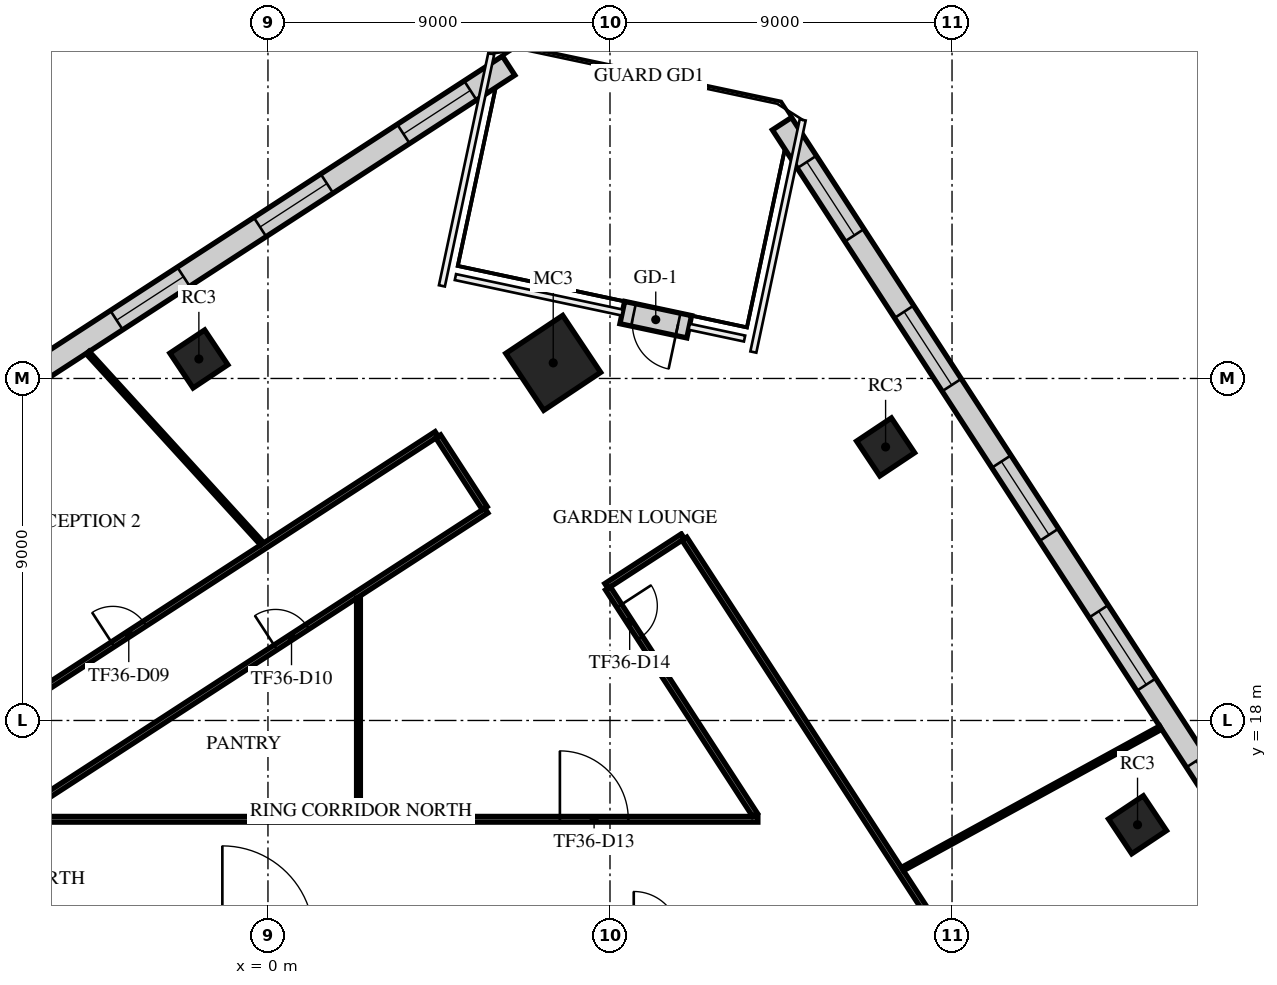
"""IFC4 building model, lengths in metres.
Left out: names, types, materials, properties, quantities, classifications, styles, units other than length and angle.
Written with IfcOpenShell. Run it as: python <this file> out.ifc"""

import sys

from ifc_helpers import new_model, si_unit, direction, frame, frame_2d, origin, origin_2d, place, context, subcontext, project, spatial, rectangle, extrude, element, fill, save


model = new_model("IFC4")
c1 = context("Model", 3, precision=1e-05, world=origin(), true_north=direction((0.0, 1.0)))
c2 = subcontext(c1, "Body", "Model", "MODEL_VIEW")
j1 = project(units=[si_unit("LENGTHUNIT", "METRE"), si_unit("PLANEANGLEUNIT", "RADIAN")], contexts=[c1])
p1 = place(None, origin())
s1 = spatial("IfcSite", under=j1, at=p1, CompositionType="ELEMENT")
p2 = place(p1, origin())
s2 = spatial("IfcBuilding", under=s1, at=p2, CompositionType="ELEMENT")
p3 = place(p2, frame((0.0, 0.0, 155.7)))
s3 = spatial("IfcBuildingStorey", under=s2, at=p3, CompositionType="ELEMENT", Elevation=155.7)
p4 = place(p3, frame((7.506, 27.41, 0.0), z_axis=(0.0, 0.0, 1.0), x_axis=(0.832028680356, 0.55473261583, 0.0)))
e1 = element("IfcColumn", 1, at=p4, inside=s3, PredefinedType="COLUMN", context=c2, shape_type="SweptSolid", body=[
    extrude(rectangle(XDim=1.8, YDim=1.8, at=origin_2d()), origin(), (0.0, 0.0, 1.0), 4.0),
])
for number, where, z_axis, x_axis in (
    (2, (-1.818, 27.513, 0.0), (0.0, 0.0, 1.0), (0.832, 0.555, 0.0)),
    (3, (22.881, 15.255, 0.0), (0.0, 0.0, 1.0), (0.832, 0.555, 0.0)),
    (4, (16.252, 25.198, 0.0), (0.0, 0.0, 1.0), (0.832, 0.555, 0.0)),
):
    element("IfcColumn", number, at=place(p3, frame(where, z_axis=z_axis, x_axis=x_axis)), inside=s3, PredefinedType="COLUMN", context=c2, shape_type="SweptSolid", body=[
        extrude(rectangle(XDim=1.1, YDim=1.1, at=origin_2d()), origin(), (0.0, 0.0, 1.0), 4.0),
    ])
p5 = place(p3, frame((6.333, 35.233, 0.0), z_axis=(0.0, 0.0, 1.0), x_axis=(-0.83867264201, -0.544635841222, 0.0)))
e5 = element("IfcWall", 5, at=p5, inside=s3, PredefinedType="STANDARD", context=c2, shape_type="SweptSolid", body=[
    extrude(rectangle(XDim=49.376, YDim=0.6, at=frame_2d((24.688, 0.0))), origin(), (0.0, 0.0, 1.0), 3.6),
])
p6 = place(p5, frame((1.2, 0.0, 0.9)))
e6 = element("IfcOpeningElement", 6, at=p6, cuts=e5, PredefinedType="OPENING", context=c2, shape_type="SweptSolid", body=[
    extrude(rectangle(XDim=2.1, YDim=2.1, at=frame_2d((1.05, 1.05))), frame((0.0, 0.31, 0.0), z_axis=(0.0, -1.0, 0.0), x_axis=(1.0, 0.0, 0.0)), (0.0, 0.0, 1.0), 0.62),
])
p7 = place(p5, frame((5.7, 0.0, 0.9)))
e7 = element("IfcOpeningElement", 7, at=p7, cuts=e5, PredefinedType="OPENING", context=c2, shape_type="SweptSolid", body=[
    extrude(rectangle(XDim=2.1, YDim=2.1, at=frame_2d((1.05, 1.05))), frame((0.0, 0.31, 0.0), z_axis=(0.0, -1.0, 0.0), x_axis=(1.0, 0.0, 0.0)), (0.0, 0.0, 1.0), 0.62),
])
p8 = place(p5, frame((10.2, 0.0, 0.9)))
e8 = element("IfcOpeningElement", 8, at=p8, cuts=e5, PredefinedType="OPENING", context=c2, shape_type="SweptSolid", body=[
    extrude(rectangle(XDim=2.1, YDim=2.1, at=frame_2d((1.05, 1.05))), frame((0.0, 0.31, 0.0), z_axis=(0.0, -1.0, 0.0), x_axis=(1.0, 0.0, 0.0)), (0.0, 0.0, 1.0), 0.62),
])
p9 = place(p5, frame((14.7, 0.0, 0.9)))
e9 = element("IfcOpeningElement", 9, at=p9, cuts=e5, PredefinedType="OPENING", context=c2, shape_type="SweptSolid", body=[
    extrude(rectangle(XDim=2.1, YDim=2.1, at=frame_2d((1.05, 1.05))), frame((0.0, 0.31, 0.0), z_axis=(0.0, -1.0, 0.0), x_axis=(1.0, 0.0, 0.0)), (0.0, 0.0, 1.0), 0.62),
])
p10 = place(p5, frame((19.2, 0.0, 0.9)))
e10 = element("IfcOpeningElement", 10, at=p10, cuts=e5, PredefinedType="OPENING", context=c2, shape_type="SweptSolid", body=[
    extrude(rectangle(XDim=2.1, YDim=2.1, at=frame_2d((1.05, 1.05))), frame((0.0, 0.31, 0.0), z_axis=(0.0, -1.0, 0.0), x_axis=(1.0, 0.0, 0.0)), (0.0, 0.0, 1.0), 0.62),
])
p11 = place(p5, frame((23.7, 0.0, 0.9)))
e11 = element("IfcOpeningElement", 11, at=p11, cuts=e5, PredefinedType="OPENING", context=c2, shape_type="SweptSolid", body=[
    extrude(rectangle(XDim=2.1, YDim=2.1, at=frame_2d((1.05, 1.05))), frame((0.0, 0.31, 0.0), z_axis=(0.0, -1.0, 0.0), x_axis=(1.0, 0.0, 0.0)), (0.0, 0.0, 1.0), 0.62),
])
p12 = place(p5, frame((28.2, 0.0, 0.9)))
e12 = element("IfcOpeningElement", 12, at=p12, cuts=e5, PredefinedType="OPENING", context=c2, shape_type="SweptSolid", body=[
    extrude(rectangle(XDim=2.1, YDim=2.1, at=frame_2d((1.05, 1.05))), frame((0.0, 0.31, 0.0), z_axis=(0.0, -1.0, 0.0), x_axis=(1.0, 0.0, 0.0)), (0.0, 0.0, 1.0), 0.62),
])
p13 = place(p5, frame((32.7, 0.0, 0.9)))
e13 = element("IfcOpeningElement", 13, at=p13, cuts=e5, PredefinedType="OPENING", context=c2, shape_type="SweptSolid", body=[
    extrude(rectangle(XDim=2.1, YDim=2.1, at=frame_2d((1.05, 1.05))), frame((0.0, 0.31, 0.0), z_axis=(0.0, -1.0, 0.0), x_axis=(1.0, 0.0, 0.0)), (0.0, 0.0, 1.0), 0.62),
])
p14 = place(p5, frame((37.2, 0.0, 0.9)))
e14 = element("IfcOpeningElement", 14, at=p14, cuts=e5, PredefinedType="OPENING", context=c2, shape_type="SweptSolid", body=[
    extrude(rectangle(XDim=2.1, YDim=2.1, at=frame_2d((1.05, 1.05))), frame((0.0, 0.31, 0.0), z_axis=(0.0, -1.0, 0.0), x_axis=(1.0, 0.0, 0.0)), (0.0, 0.0, 1.0), 0.62),
])
p15 = place(p5, frame((41.7, 0.0, 0.9)))
e15 = element("IfcOpeningElement", 15, at=p15, cuts=e5, PredefinedType="OPENING", context=c2, shape_type="SweptSolid", body=[
    extrude(rectangle(XDim=2.1, YDim=2.1, at=frame_2d((1.05, 1.05))), frame((0.0, 0.31, 0.0), z_axis=(0.0, -1.0, 0.0), x_axis=(1.0, 0.0, 0.0)), (0.0, 0.0, 1.0), 0.62),
])
p16 = place(p5, frame((46.138, 0.0, 0.9)))
e16 = element("IfcOpeningElement", 16, at=p16, cuts=e5, PredefinedType="OPENING", context=c2, shape_type="SweptSolid", body=[
    extrude(rectangle(XDim=2.1, YDim=2.1, at=frame_2d((1.05, 1.05))), frame((0.0, 0.31, 0.0), z_axis=(0.0, -1.0, 0.0), x_axis=(1.0, 0.0, 0.0)), (0.0, 0.0, 1.0), 0.62),
])
p17 = place(p3, frame((36.496, -1.667, 0.0), z_axis=(0.0, 0.0, 1.0), x_axis=(-0.544637117646, 0.838671813096, 0.0)))
e17 = element("IfcWall", 17, at=p17, inside=s3, PredefinedType="STANDARD", context=c2, shape_type="SweptSolid", body=[
    extrude(rectangle(XDim=42.176, YDim=0.6, at=frame_2d((21.088, 0.0))), origin(), (0.0, 0.0, 1.0), 3.6),
])
p18 = place(p17, frame((1.138, 0.0, 0.9)))
e18 = element("IfcOpeningElement", 18, at=p18, cuts=e17, PredefinedType="OPENING", context=c2, shape_type="SweptSolid", body=[
    extrude(rectangle(XDim=2.3, YDim=2.1, at=frame_2d((1.15, 1.05))), frame((0.0, 0.31, 0.0), z_axis=(0.0, -1.0, 0.0), x_axis=(1.0, 0.0, 0.0)), (0.0, 0.0, 1.0), 0.62),
])
p19 = place(p17, frame((5.776, 0.0, 0.9)))
e19 = element("IfcOpeningElement", 19, at=p19, cuts=e17, PredefinedType="OPENING", context=c2, shape_type="SweptSolid", body=[
    extrude(rectangle(XDim=2.3, YDim=2.1, at=frame_2d((1.15, 1.05))), frame((0.0, 0.31, 0.0), z_axis=(0.0, -1.0, 0.0), x_axis=(1.0, 0.0, 0.0)), (0.0, 0.0, 1.0), 0.62),
])
p20 = place(p17, frame((10.476, 0.0, 0.9)))
e20 = element("IfcOpeningElement", 20, at=p20, cuts=e17, PredefinedType="OPENING", context=c2, shape_type="SweptSolid", body=[
    extrude(rectangle(XDim=2.3, YDim=2.1, at=frame_2d((1.15, 1.05))), frame((0.0, 0.31, 0.0), z_axis=(0.0, -1.0, 0.0), x_axis=(1.0, 0.0, 0.0)), (0.0, 0.0, 1.0), 0.62),
])
p21 = place(p17, frame((15.176, 0.0, 0.9)))
e21 = element("IfcOpeningElement", 21, at=p21, cuts=e17, PredefinedType="OPENING", context=c2, shape_type="SweptSolid", body=[
    extrude(rectangle(XDim=2.3, YDim=2.1, at=frame_2d((1.15, 1.05))), frame((0.0, 0.31, 0.0), z_axis=(0.0, -1.0, 0.0), x_axis=(1.0, 0.0, 0.0)), (0.0, 0.0, 1.0), 0.62),
])
p22 = place(p17, frame((19.876, 0.0, 0.9)))
e22 = element("IfcOpeningElement", 22, at=p22, cuts=e17, PredefinedType="OPENING", context=c2, shape_type="SweptSolid", body=[
    extrude(rectangle(XDim=2.3, YDim=2.1, at=frame_2d((1.15, 1.05))), frame((0.0, 0.31, 0.0), z_axis=(0.0, -1.0, 0.0), x_axis=(1.0, 0.0, 0.0)), (0.0, 0.0, 1.0), 0.62),
])
p23 = place(p17, frame((24.576, 0.0, 0.9)))
e23 = element("IfcOpeningElement", 23, at=p23, cuts=e17, PredefinedType="OPENING", context=c2, shape_type="SweptSolid", body=[
    extrude(rectangle(XDim=2.3, YDim=2.1, at=frame_2d((1.15, 1.05))), frame((0.0, 0.31, 0.0), z_axis=(0.0, -1.0, 0.0), x_axis=(1.0, 0.0, 0.0)), (0.0, 0.0, 1.0), 0.62),
])
p24 = place(p17, frame((29.276, 0.0, 0.9)))
e24 = element("IfcOpeningElement", 24, at=p24, cuts=e17, PredefinedType="OPENING", context=c2, shape_type="SweptSolid", body=[
    extrude(rectangle(XDim=2.3, YDim=2.1, at=frame_2d((1.15, 1.05))), frame((0.0, 0.31, 0.0), z_axis=(0.0, -1.0, 0.0), x_axis=(1.0, 0.0, 0.0)), (0.0, 0.0, 1.0), 0.62),
])
p25 = place(p17, frame((33.976, 0.0, 0.9)))
e25 = element("IfcOpeningElement", 25, at=p25, cuts=e17, PredefinedType="OPENING", context=c2, shape_type="SweptSolid", body=[
    extrude(rectangle(XDim=2.3, YDim=2.1, at=frame_2d((1.15, 1.05))), frame((0.0, 0.31, 0.0), z_axis=(0.0, -1.0, 0.0), x_axis=(1.0, 0.0, 0.0)), (0.0, 0.0, 1.0), 0.62),
])
p26 = place(p17, frame((38.676, 0.0, 0.9)))
e26 = element("IfcOpeningElement", 26, at=p26, cuts=e17, PredefinedType="OPENING", context=c2, shape_type="SweptSolid", body=[
    extrude(rectangle(XDim=2.3, YDim=2.1, at=frame_2d((1.15, 1.05))), frame((0.0, 0.31, 0.0), z_axis=(0.0, -1.0, 0.0), x_axis=(1.0, 0.0, 0.0)), (0.0, 0.0, 1.0), 0.62),
])
p27 = place(p3, frame((11.084, 28.361, 0.0), z_axis=(0.0, 0.0, 1.0), x_axis=(-0.978174015353, 0.207787380965, 0.0)))
e27 = element("IfcWall", 27, at=p27, inside=s3, PredefinedType="STANDARD", context=c2, shape_type="SweptSolid", body=[
    extrude(rectangle(XDim=1.8, YDim=0.6, at=frame_2d((0.9, 0.0))), origin(), (0.0, 0.0, 1.0), 3.6),
])
p28 = place(p27, frame((0.3, 0.0, 0.0)))
e28 = element("IfcOpeningElement", 28, at=p28, cuts=e27, PredefinedType="OPENING", context=c2, shape_type="SweptSolid", body=[
    extrude(rectangle(XDim=1.2, YDim=2.4, at=frame_2d((0.6, 1.2))), frame((0.0, 0.31, 0.0), z_axis=(0.0, -1.0, 0.0), x_axis=(1.0, 0.0, 0.0)), (0.0, 0.0, 1.0), 0.62),
])
p29 = place(p3, frame((-25.134, 6.331, 0.0), z_axis=(0.0, 0.0, 1.0), x_axis=(0.838655992286, 0.544661478904, 0.0)))
e29 = element("IfcWall", 29, at=p29, inside=s3, PredefinedType="PARTITIONING", context=c2, shape_type="SweptSolid", body=[
    extrude(rectangle(XDim=35.262, YDim=0.15, at=frame_2d((17.631, 0.0))), origin(), (0.0, 0.0, 1.0), 3.15),
])
p30 = place(p29, frame((0.55, 0.0, 0.0)))
e30 = element("IfcOpeningElement", 30, at=p30, cuts=e29, PredefinedType="OPENING", context=c2, shape_type="SweptSolid", body=[
    extrude(rectangle(XDim=1.0, YDim=2.1, at=frame_2d((0.5, 1.05))), frame((0.0, 0.085, 0.0), z_axis=(0.0, -1.0, 0.0), x_axis=(1.0, 0.0, 0.0)), (0.0, 0.0, 1.0), 0.17),
])
p31 = place(p29, frame((5.989, 0.0, 0.0)))
e31 = element("IfcOpeningElement", 31, at=p31, cuts=e29, PredefinedType="OPENING", context=c2, shape_type="SweptSolid", body=[
    extrude(rectangle(XDim=1.0, YDim=2.1, at=frame_2d((0.5, 1.05))), frame((0.0, 0.085, 0.0), z_axis=(0.0, -1.0, 0.0), x_axis=(1.0, 0.0, 0.0)), (0.0, 0.0, 1.0), 0.17),
])
p32 = place(p29, frame((17.183, 0.0, 0.0)))
e32 = element("IfcOpeningElement", 32, at=p32, cuts=e29, PredefinedType="OPENING", context=c2, shape_type="SweptSolid", body=[
    extrude(rectangle(XDim=1.0, YDim=2.1, at=frame_2d((0.5, 1.05))), frame((0.0, 0.085, 0.0), z_axis=(0.0, -1.0, 0.0), x_axis=(1.0, 0.0, 0.0)), (0.0, 0.0, 1.0), 0.17),
])
p33 = place(p29, frame((25.102, 0.0, 0.0)))
e33 = element("IfcOpeningElement", 33, at=p33, cuts=e29, PredefinedType="OPENING", context=c2, shape_type="SweptSolid", body=[
    extrude(rectangle(XDim=1.0, YDim=2.1, at=frame_2d((0.5, 1.05))), frame((0.0, 0.085, 0.0), z_axis=(0.0, -1.0, 0.0), x_axis=(1.0, 0.0, 0.0)), (0.0, 0.0, 1.0), 0.17),
])
p34 = place(p3, frame((-6.763, 15.4, 0.0), z_axis=(0.0, 0.0, 1.0), x_axis=(1.0, 0.0, 0.0)))
e34 = element("IfcWall", 34, at=p34, inside=s3, PredefinedType="PARTITIONING", context=c2, shape_type="SweptSolid", body=[
    extrude(rectangle(XDim=19.654, YDim=0.15, at=frame_2d((9.827, 0.0))), origin(), (0.0, 0.0, 1.0), 3.15),
])
p35 = place(p34, frame((14.445, 0.0, 0.0)))
e35 = element("IfcOpeningElement", 35, at=p35, cuts=e34, PredefinedType="OPENING", context=c2, shape_type="SweptSolid", body=[
    extrude(rectangle(XDim=1.8, YDim=2.1, at=frame_2d((0.9, 1.05))), frame((0.0, 0.085, 0.0), z_axis=(0.0, -1.0, 0.0), x_axis=(1.0, 0.0, 0.0)), (0.0, 0.0, 1.0), 0.17),
])
p36 = place(p3, frame((-6.551, 15.538, 0.0), z_axis=(0.0, 0.0, 1.0), x_axis=(0.838658107211, 0.544658222383, 0.0)))
e36 = element("IfcWall", 36, at=p36, inside=s3, PredefinedType="PARTITIONING", context=c2, shape_type="SweptSolid", body=[
    extrude(rectangle(XDim=14.663, YDim=0.15, at=frame_2d((7.331, 0.0))), origin(), (0.0, 0.0, 1.0), 3.15),
])
p37 = place(p36, frame((8.05, 0.0, 0.0)))
e37 = element("IfcOpeningElement", 37, at=p37, cuts=e36, PredefinedType="OPENING", context=c2, shape_type="SweptSolid", body=[
    extrude(rectangle(XDim=1.0, YDim=2.1, at=frame_2d((0.5, 1.05))), frame((0.0, 0.085, 0.0), z_axis=(0.0, -1.0, 0.0), x_axis=(1.0, 0.0, 0.0)), (0.0, 0.0, 1.0), 0.17),
])
p38 = place(p3, frame((4.48, 25.474, 0.0), z_axis=(0.0, 0.0, 1.0), x_axis=(0.544568768869, -0.83871619513, 0.0)))
e38 = element("IfcWall", 38, at=p38, inside=s3, PredefinedType="PARTITIONING", context=c2, shape_type="SweptSolid", body=[
    extrude(rectangle(XDim=2.25, YDim=0.15, at=frame_2d((1.125, 0.0))), origin(), (0.0, 0.0, 1.0), 3.6),
])
p39 = place(p3, frame((8.905, 21.539, 0.0), z_axis=(0.0, 0.0, 1.0), x_axis=(0.838613296719, 0.544727214821, 0.0)))
e39 = element("IfcWall", 39, at=p39, inside=s3, PredefinedType="PARTITIONING", context=c2, shape_type="SweptSolid", body=[
    extrude(rectangle(XDim=2.399, YDim=0.15, at=frame_2d((1.2, 0.0))), origin(), (0.0, 0.0, 1.0), 3.6),
])
p40 = place(p3, frame((8.946, 21.476, 0.0), z_axis=(0.0, 0.0, 1.0), x_axis=(0.544591006373, -0.838701756155, 0.0)))
e40 = element("IfcWall", 40, at=p40, inside=s3, PredefinedType="PARTITIONING", context=c2, shape_type="SweptSolid", body=[
    extrude(rectangle(XDim=7.106, YDim=0.15, at=frame_2d((3.553, 0.0))), origin(), (0.0, 0.0, 1.0), 3.15),
])
p41 = place(p40, frame((0.55, 0.0, 0.0)))
e41 = element("IfcOpeningElement", 41, at=p41, cuts=e40, PredefinedType="OPENING", context=c2, shape_type="SweptSolid", body=[
    extrude(rectangle(XDim=1.0, YDim=2.1, at=frame_2d((0.5, 1.05))), frame((0.0, 0.085, 0.0), z_axis=(0.0, -1.0, 0.0), x_axis=(1.0, 0.0, 0.0)), (0.0, 0.0, 1.0), 0.17),
])
p42 = place(p3, frame((10.958, 22.783, 0.0), z_axis=(0.0, 0.0, 1.0), x_axis=(0.544655201926, -0.838660068809, 0.0)))
e42 = element("IfcWall", 42, at=p42, inside=s3, PredefinedType="PARTITIONING", context=c2, shape_type="SweptSolid", body=[
    extrude(rectangle(XDim=26.354, YDim=0.15, at=frame_2d((13.177, 0.0))), origin(), (0.0, 0.0, 1.0), 3.15),
])
p43 = place(p42, frame((13.46, 0.0, 0.0)))
e43 = element("IfcOpeningElement", 43, at=p43, cuts=e42, PredefinedType="OPENING", context=c2, shape_type="SweptSolid", body=[
    extrude(rectangle(XDim=1.0, YDim=2.1, at=frame_2d((0.5, 1.05))), frame((0.0, 0.085, 0.0), z_axis=(0.0, -1.0, 0.0), x_axis=(1.0, 0.0, 0.0)), (0.0, 0.0, 1.0), 0.17),
])
p44 = place(p3, frame((-4.744, 27.68, 0.0), z_axis=(0.0, 0.0, 1.0), x_axis=(0.673918024529, -0.738806128977, 0.0)))
e44 = element("IfcWall", 44, at=p44, inside=s3, PredefinedType="PARTITIONING", context=c2, shape_type="SweptSolid", body=[
    extrude(rectangle(XDim=6.806, YDim=0.1, at=frame_2d((3.403, 0.0))), origin(), (0.0, 0.0, 1.0), 2.9),
])
p45 = place(p3, frame((2.382, 15.475, 0.0), z_axis=(0.0, 0.0, 1.0), x_axis=(0.0, 1.0, 0.0)))
e45 = element("IfcWall", 45, at=p45, inside=s3, PredefinedType="PARTITIONING", context=c2, shape_type="SweptSolid", body=[
    extrude(rectangle(XDim=5.742, YDim=0.1, at=frame_2d((2.871, 0.0))), origin(), (0.0, 0.0, 1.0), 3.15),
])
p46 = place(p3, frame((16.697, 14.091, 0.0), z_axis=(0.0, 0.0, 1.0), x_axis=(0.877061470745, 0.480378159926, 0.0)))
e46 = element("IfcWall", 46, at=p46, inside=s3, PredefinedType="PARTITIONING", context=c2, shape_type="SweptSolid", body=[
    extrude(rectangle(XDim=7.742, YDim=0.1, at=frame_2d((3.871, 0.0))), origin(), (0.0, 0.0, 1.0), 2.9),
])
p47 = place(p6, origin())
e47 = element("IfcWindow", 47, at=p47, inside=s3, PartitioningType="SINGLE_PANEL", PredefinedType="WINDOW", context=c2, shape_type="SweptSolid", body=[
    extrude(rectangle(XDim=2.1, YDim=2.1, at=frame_2d((1.05, 1.05))), frame((0.0, 0.03, 0.0), z_axis=(0.0, -1.0, 0.0), x_axis=(1.0, 0.0, 0.0)), (0.0, 0.0, 1.0), 0.06),
])
fill(e6, e47)
p48 = place(p7, origin())
e48 = element("IfcWindow", 48, at=p48, inside=s3, PartitioningType="SINGLE_PANEL", PredefinedType="WINDOW", context=c2, shape_type="SweptSolid", body=[
    extrude(rectangle(XDim=2.1, YDim=2.1, at=frame_2d((1.05, 1.05))), frame((0.0, 0.03, 0.0), z_axis=(0.0, -1.0, 0.0), x_axis=(1.0, 0.0, 0.0)), (0.0, 0.0, 1.0), 0.06),
])
fill(e7, e48)
p49 = place(p8, origin())
e49 = element("IfcWindow", 49, at=p49, inside=s3, PartitioningType="SINGLE_PANEL", PredefinedType="WINDOW", context=c2, shape_type="SweptSolid", body=[
    extrude(rectangle(XDim=2.1, YDim=2.1, at=frame_2d((1.05, 1.05))), frame((0.0, 0.03, 0.0), z_axis=(0.0, -1.0, 0.0), x_axis=(1.0, 0.0, 0.0)), (0.0, 0.0, 1.0), 0.06),
])
fill(e8, e49)
p50 = place(p22, origin())
e50 = element("IfcWindow", 50, at=p50, inside=s3, PartitioningType="SINGLE_PANEL", PredefinedType="WINDOW", context=c2, shape_type="SweptSolid", body=[
    extrude(rectangle(XDim=2.3, YDim=2.1, at=frame_2d((1.15, 1.05))), frame((0.0, 0.03, 0.0), z_axis=(0.0, -1.0, 0.0), x_axis=(1.0, 0.0, 0.0)), (0.0, 0.0, 1.0), 0.06),
])
fill(e22, e50)
p51 = place(p23, origin())
e51 = element("IfcWindow", 51, at=p51, inside=s3, PartitioningType="SINGLE_PANEL", PredefinedType="WINDOW", context=c2, shape_type="SweptSolid", body=[
    extrude(rectangle(XDim=2.3, YDim=2.1, at=frame_2d((1.15, 1.05))), frame((0.0, 0.03, 0.0), z_axis=(0.0, -1.0, 0.0), x_axis=(1.0, 0.0, 0.0)), (0.0, 0.0, 1.0), 0.06),
])
fill(e23, e51)
p52 = place(p24, origin())
e52 = element("IfcWindow", 52, at=p52, inside=s3, PartitioningType="SINGLE_PANEL", PredefinedType="WINDOW", context=c2, shape_type="SweptSolid", body=[
    extrude(rectangle(XDim=2.3, YDim=2.1, at=frame_2d((1.15, 1.05))), frame((0.0, 0.03, 0.0), z_axis=(0.0, -1.0, 0.0), x_axis=(1.0, 0.0, 0.0)), (0.0, 0.0, 1.0), 0.06),
])
fill(e24, e52)
p53 = place(p25, origin())
e53 = element("IfcWindow", 53, at=p53, inside=s3, PartitioningType="SINGLE_PANEL", PredefinedType="WINDOW", context=c2, shape_type="SweptSolid", body=[
    extrude(rectangle(XDim=2.3, YDim=2.1, at=frame_2d((1.15, 1.05))), frame((0.0, 0.03, 0.0), z_axis=(0.0, -1.0, 0.0), x_axis=(1.0, 0.0, 0.0)), (0.0, 0.0, 1.0), 0.06),
])
fill(e25, e53)
p54 = place(p26, origin())
e54 = element("IfcWindow", 54, at=p54, inside=s3, PartitioningType="SINGLE_PANEL", PredefinedType="WINDOW", context=c2, shape_type="SweptSolid", body=[
    extrude(rectangle(XDim=2.3, YDim=2.1, at=frame_2d((1.15, 1.05))), frame((0.0, 0.03, 0.0), z_axis=(0.0, -1.0, 0.0), x_axis=(1.0, 0.0, 0.0)), (0.0, 0.0, 1.0), 0.06),
])
fill(e26, e54)
p55 = place(p28, origin())
e55 = element("IfcDoor", 55, at=p55, inside=s3, OperationType="SINGLE_SWING_LEFT", PredefinedType="DOOR", context=c2, shape_type="SweptSolid", body=[
    extrude(rectangle(XDim=1.2, YDim=2.4, at=frame_2d((0.6, 1.2))), frame((0.0, 0.025, 0.0), z_axis=(0.0, -1.0, 0.0), x_axis=(1.0, 0.0, 0.0)), (0.0, 0.0, 1.0), 0.05),
])
fill(e28, e55)
p56 = place(p33, origin())
e56 = element("IfcDoor", 56, at=p56, inside=s3, OperationType="SINGLE_SWING_LEFT", PredefinedType="DOOR", context=c2, shape_type="SweptSolid", body=[
    extrude(rectangle(XDim=1.0, YDim=2.1, at=frame_2d((0.5, 1.05))), frame((0.0, 0.025, 0.0), z_axis=(0.0, -1.0, 0.0), x_axis=(1.0, 0.0, 0.0)), (0.0, 0.0, 1.0), 0.05),
])
fill(e33, e56)
p57 = place(p37, frame((1.0, 0.0, 0.0), z_axis=(0.0, 0.0, 1.0), x_axis=(-1.0, 0.0, 0.0)))
e57 = element("IfcDoor", 57, at=p57, inside=s3, OperationType="SINGLE_SWING_RIGHT", PredefinedType="DOOR", context=c2, shape_type="SweptSolid", body=[
    extrude(rectangle(XDim=1.0, YDim=2.1, at=frame_2d((0.5, 1.05))), frame((0.0, 0.025, 0.0), z_axis=(0.0, -1.0, 0.0), x_axis=(1.0, 0.0, 0.0)), (0.0, 0.0, 1.0), 0.05),
])
fill(e37, e57)
p58 = place(p35, origin())
e58 = element("IfcDoor", 58, at=p58, inside=s3, OperationType="DOUBLE_DOOR_SINGLE_SWING", PredefinedType="DOOR", context=c2, shape_type="SweptSolid", body=[
    extrude(rectangle(XDim=1.8, YDim=2.1, at=frame_2d((0.9, 1.05))), frame((0.0, 0.025, 0.0), z_axis=(0.0, -1.0, 0.0), x_axis=(1.0, 0.0, 0.0)), (0.0, 0.0, 1.0), 0.05),
])
fill(e35, e58)
p59 = place(p41, frame((1.0, 0.0, 0.0), z_axis=(0.0, 0.0, 1.0), x_axis=(-1.0, 0.0, 0.0)))
e59 = element("IfcDoor", 59, at=p59, inside=s3, OperationType="SINGLE_SWING_RIGHT", PredefinedType="DOOR", context=c2, shape_type="SweptSolid", body=[
    extrude(rectangle(XDim=1.0, YDim=2.1, at=frame_2d((0.5, 1.05))), frame((0.0, 0.025, 0.0), z_axis=(0.0, -1.0, 0.0), x_axis=(1.0, 0.0, 0.0)), (0.0, 0.0, 1.0), 0.05),
])
fill(e41, e59)
save(model, sys.argv[1])
